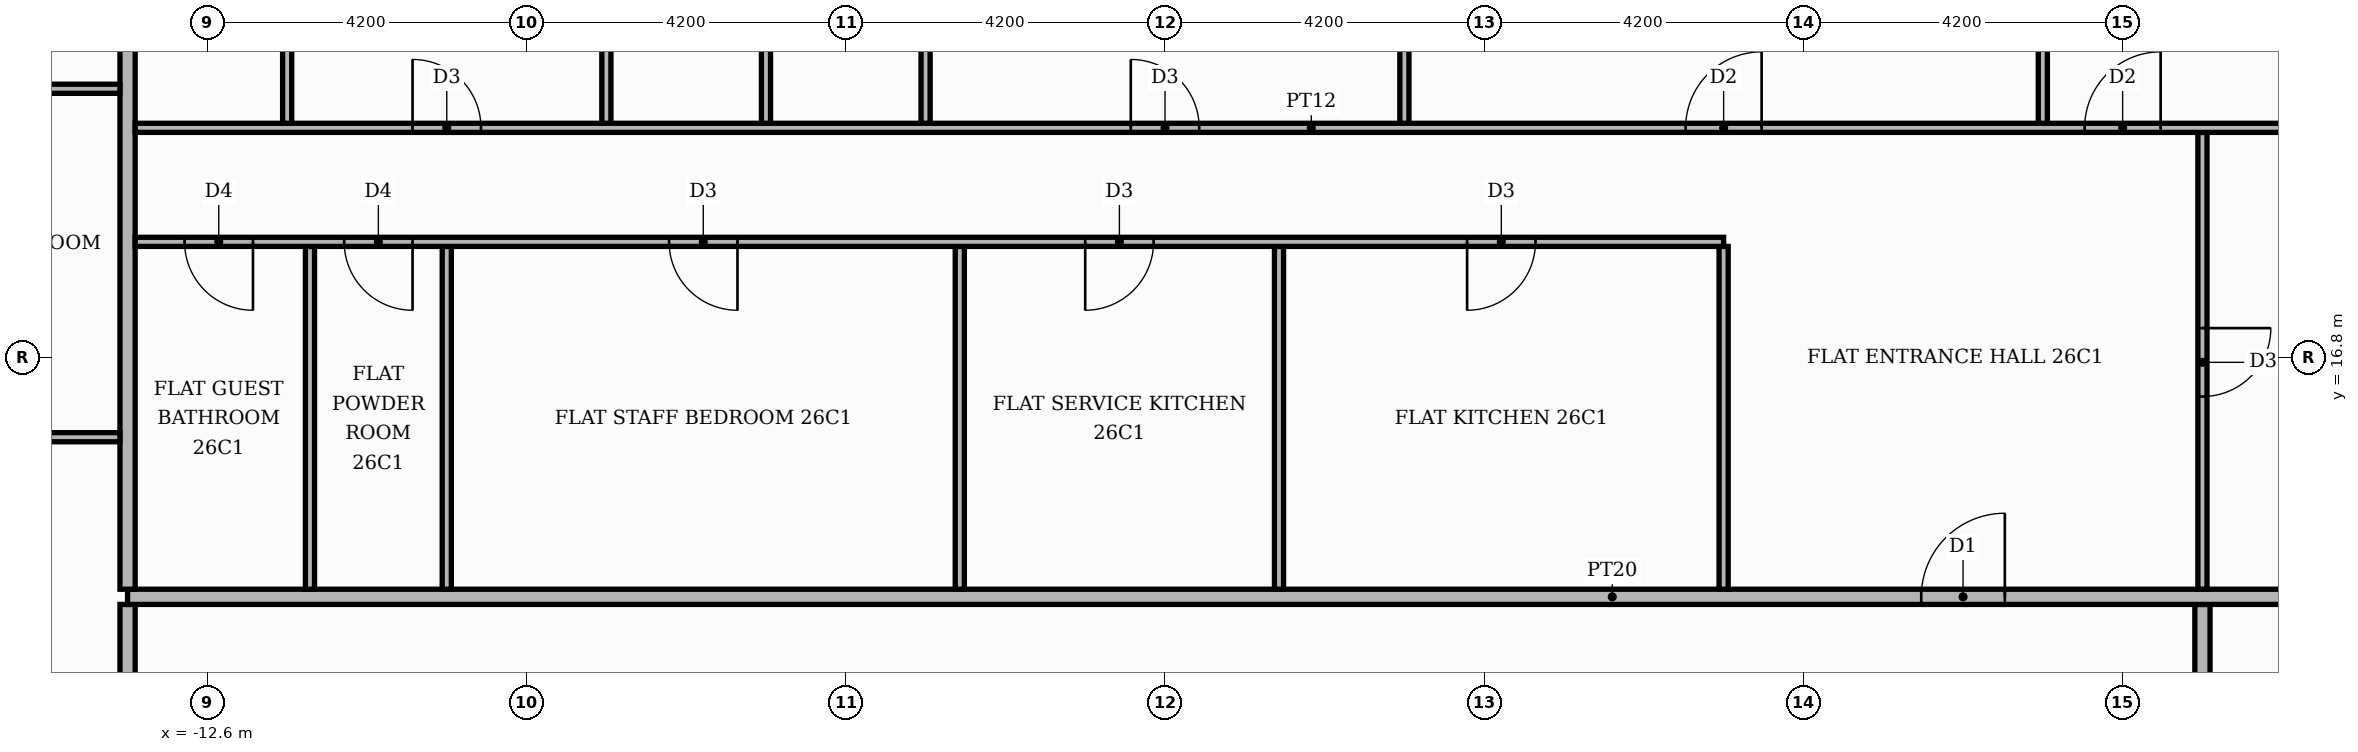
"""IFC4 building model, lengths in metres.
Left out: names, types, materials, properties, quantities, classifications, styles, units other than length and angle.
Written with IfcOpenShell. Run it as: python <this file> out.ifc"""

import sys

from ifc_helpers import new_model, si_unit, direction, frame, frame_2d, origin, place, context, subcontext, project, spatial, rectangle, extrude, element, fill, save


model = new_model("IFC4")
c1 = context("Model", 3, precision=1e-05, world=origin(), true_north=direction((0.0, 1.0)))
c2 = subcontext(c1, "Body", "Model", "MODEL_VIEW")
j1 = project(units=[si_unit("LENGTHUNIT", "METRE"), si_unit("PLANEANGLEUNIT", "RADIAN")], contexts=[c1])
p1 = place(None, origin())
s1 = spatial("IfcSite", under=j1, at=p1, CompositionType="ELEMENT")
p2 = place(p1, origin())
s2 = spatial("IfcBuilding", under=s1, at=p2, CompositionType="ELEMENT")
p3 = place(p2, frame((0.0, 0.0, 110.4)))
s3 = spatial("IfcBuildingStorey", under=s2, at=p3, CompositionType="ELEMENT", Elevation=110.4)
p4 = place(p3, frame((13.65, -13.55, 0.0), z_axis=(0.0, 0.0, 1.0), x_axis=(0.0, 1.0, 0.0)))
e1 = element("IfcWall", 1, at=p4, inside=s3, PredefinedType="PARTITIONING", context=c2, shape_type="SweptSolid", body=[
    extrude(rectangle(XDim=27.1, YDim=0.2, at=frame_2d((13.55, 0.0))), origin(), (0.0, 0.0, 1.0), 3.48),
])
p5 = place(p4, frame((2.5, 0.0, 0.0)))
e2 = element("IfcOpeningElement", 2, at=p5, cuts=e1, PredefinedType="OPENING", context=c2, shape_type="SweptSolid", body=[
    extrude(rectangle(XDim=1.1, YDim=2.4, at=frame_2d((0.55, 1.2))), frame((0.0, 0.11, 0.0), z_axis=(0.0, -1.0, 0.0), x_axis=(1.0, 0.0, 0.0)), (0.0, 0.0, 1.0), 0.22),
])
p6 = place(p3, frame((-13.65, 5.35, 0.0), z_axis=(0.0, 0.0, 1.0), x_axis=(0.0, 1.0, 0.0)))
e3 = element("IfcWall", 3, at=p6, inside=s3, PredefinedType="PARTITIONING", context=c2, shape_type="SweptSolid", body=[
    extrude(rectangle(XDim=8.2, YDim=0.2, at=frame_2d((4.1, 0.0))), origin(), (0.0, 0.0, 1.0), 3.48),
])
p7 = place(p6, frame((5.65, 0.0, 0.0)))
e4 = element("IfcOpeningElement", 4, at=p7, cuts=e3, PredefinedType="OPENING", context=c2, shape_type="SweptSolid", body=[
    extrude(rectangle(XDim=1.1, YDim=2.4, at=frame_2d((0.55, 1.2))), frame((0.0, 0.11, 0.0), z_axis=(0.0, -1.0, 0.0), x_axis=(1.0, 0.0, 0.0)), (0.0, 0.0, 1.0), 0.22),
])
p8 = place(p3, frame((-13.65, 13.65, 0.0), z_axis=(0.0, 0.0, 1.0), x_axis=(1.0, 0.0, 0.0)))
e5 = element("IfcWall", 5, at=p8, inside=s3, PredefinedType="PARTITIONING", context=c2, shape_type="SweptSolid", body=[
    extrude(rectangle(XDim=39.07, YDim=0.2, at=frame_2d((19.535, 0.0))), origin(), (0.0, 0.0, 1.0), 3.48),
])
p9 = place(p8, frame((23.6, 0.0, 0.0)))
e6 = element("IfcOpeningElement", 6, at=p9, cuts=e5, PredefinedType="OPENING", context=c2, shape_type="SweptSolid", body=[
    extrude(rectangle(XDim=1.1, YDim=2.4, at=frame_2d((0.55, 1.2))), frame((0.0, 0.11, 0.0), z_axis=(0.0, -1.0, 0.0), x_axis=(1.0, 0.0, 0.0)), (0.0, 0.0, 1.0), 0.22),
])
p10 = place(p3, frame((-13.65, 13.75, 0.0), z_axis=(0.0, 0.0, 1.0), x_axis=(0.0, 1.0, 0.0)))
e7 = element("IfcWall", 7, at=p10, inside=s3, PredefinedType="PARTITIONING", context=c2, shape_type="SweptSolid", body=[
    extrude(rectangle(XDim=11.67, YDim=0.2, at=frame_2d((5.835, 0.0))), origin(), (0.0, 0.0, 1.0), 3.48),
])
for number, where, z_axis, x_axis in (
    (8, (-11.25, 13.75, 0.0), (0.0, 0.0, 1.0), (0.0, 1.0, 0.0)),
    (9, (-9.45, 13.75, 0.0), (0.0, 0.0, 1.0), (0.0, 1.0, 0.0)),
    (10, (-2.7, 13.75, 0.0), (0.0, 0.0, 1.0), (0.0, 1.0, 0.0)),
    (11, (1.5, 13.75, 0.0), (0.0, 0.0, 1.0), (0.0, 1.0, 0.0)),
    (12, (7.35, 13.75, 0.0), (0.0, 0.0, 1.0), (0.0, 1.0, 0.0)),
):
    element("IfcWall", number, at=place(p3, frame(where, z_axis=z_axis, x_axis=x_axis)), inside=s3, PredefinedType="PARTITIONING", context=c2, shape_type="SweptSolid", body=[
        extrude(rectangle(XDim=4.51, YDim=0.12, at=frame_2d((2.255, 0.0))), origin(), (0.0, 0.0, 1.0), 3.48),
    ])
p11 = place(p3, frame((13.65, 13.75, 0.0), z_axis=(0.0, 0.0, 1.0), x_axis=(0.0, 1.0, 0.0)))
e13 = element("IfcWall", 13, at=p11, inside=s3, PredefinedType="PARTITIONING", context=c2, shape_type="SweptSolid", body=[
    extrude(rectangle(XDim=6.01, YDim=0.12, at=frame_2d((3.005, 0.0))), origin(), (0.0, 0.0, 1.0), 3.48),
])
p12 = place(p11, frame((2.535, 0.0, 0.0)))
e14 = element("IfcOpeningElement", 14, at=p12, cuts=e13, PredefinedType="OPENING", context=c2, shape_type="SweptSolid", body=[
    extrude(rectangle(XDim=0.9, YDim=2.1, at=frame_2d((0.45, 1.05))), frame((0.0, 0.07, 0.0), z_axis=(0.0, -1.0, 0.0), x_axis=(1.0, 0.0, 0.0)), (0.0, 0.0, 1.0), 0.14),
])
p13 = place(p3, frame((-20.72, 15.75, 0.0), z_axis=(0.0, 0.0, 1.0), x_axis=(1.0, 0.0, 0.0)))
e15 = element("IfcWall", 15, at=p13, inside=s3, PredefinedType="PARTITIONING", context=c2, shape_type="SweptSolid", body=[
    extrude(rectangle(XDim=6.97, YDim=0.12, at=frame_2d((3.485, 0.0))), origin(), (0.0, 0.0, 1.0), 3.48),
])
p14 = place(p13, frame((3.035, 0.0, 0.0)))
e16 = element("IfcOpeningElement", 16, at=p14, cuts=e15, PredefinedType="OPENING", context=c2, shape_type="SweptSolid", body=[
    extrude(rectangle(XDim=1.0, YDim=2.1, at=frame_2d((0.5, 1.05))), frame((0.0, 0.07, 0.0), z_axis=(0.0, -1.0, 0.0), x_axis=(1.0, 0.0, 0.0)), (0.0, 0.0, 1.0), 0.14),
])
p15 = place(p3, frame((-13.55, 18.32, 0.0), z_axis=(0.0, 0.0, 1.0), x_axis=(1.0, 0.0, 0.0)))
e17 = element("IfcWall", 17, at=p15, inside=s3, PredefinedType="PARTITIONING", context=c2, shape_type="SweptSolid", body=[
    extrude(rectangle(XDim=20.9, YDim=0.12, at=frame_2d((10.45, 0.0))), origin(), (0.0, 0.0, 1.0), 3.48),
])
p16 = place(p15, frame((17.525, 0.0, 0.0)))
e18 = element("IfcOpeningElement", 18, at=p16, cuts=e17, PredefinedType="OPENING", context=c2, shape_type="SweptSolid", body=[
    extrude(rectangle(XDim=0.9, YDim=2.1, at=frame_2d((0.45, 1.05))), frame((0.0, 0.07, 0.0), z_axis=(0.0, -1.0, 0.0), x_axis=(1.0, 0.0, 0.0)), (0.0, 0.0, 1.0), 0.14),
])
p17 = place(p15, frame((12.5, 0.0, 0.0)))
e19 = element("IfcOpeningElement", 19, at=p17, cuts=e17, PredefinedType="OPENING", context=c2, shape_type="SweptSolid", body=[
    extrude(rectangle(XDim=0.9, YDim=2.1, at=frame_2d((0.45, 1.05))), frame((0.0, 0.07, 0.0), z_axis=(0.0, -1.0, 0.0), x_axis=(1.0, 0.0, 0.0)), (0.0, 0.0, 1.0), 0.14),
])
p18 = place(p15, frame((7.025, 0.0, 0.0)))
e20 = element("IfcOpeningElement", 20, at=p18, cuts=e17, PredefinedType="OPENING", context=c2, shape_type="SweptSolid", body=[
    extrude(rectangle(XDim=0.9, YDim=2.1, at=frame_2d((0.45, 1.05))), frame((0.0, 0.07, 0.0), z_axis=(0.0, -1.0, 0.0), x_axis=(1.0, 0.0, 0.0)), (0.0, 0.0, 1.0), 0.14),
])
p19 = place(p15, frame((2.75, 0.0, 0.0)))
e21 = element("IfcOpeningElement", 21, at=p19, cuts=e17, PredefinedType="OPENING", context=c2, shape_type="SweptSolid", body=[
    extrude(rectangle(XDim=0.9, YDim=2.1, at=frame_2d((0.45, 1.05))), frame((0.0, 0.07, 0.0), z_axis=(0.0, -1.0, 0.0), x_axis=(1.0, 0.0, 0.0)), (0.0, 0.0, 1.0), 0.14),
])
p20 = place(p15, frame((0.65, 0.0, 0.0)))
e22 = element("IfcOpeningElement", 22, at=p20, cuts=e17, PredefinedType="OPENING", context=c2, shape_type="SweptSolid", body=[
    extrude(rectangle(XDim=0.9, YDim=2.1, at=frame_2d((0.45, 1.05))), frame((0.0, 0.07, 0.0), z_axis=(0.0, -1.0, 0.0), x_axis=(1.0, 0.0, 0.0)), (0.0, 0.0, 1.0), 0.14),
])
p21 = place(p3, frame((-13.55, 19.82, 0.0), z_axis=(0.0, 0.0, 1.0), x_axis=(1.0, 0.0, 0.0)))
e23 = element("IfcWall", 23, at=p21, inside=s3, PredefinedType="PARTITIONING", context=c2, shape_type="SweptSolid", body=[
    extrude(rectangle(XDim=30.95, YDim=0.12, at=frame_2d((15.475, 0.0))), origin(), (0.0, 0.0, 1.0), 3.48),
])
p22 = place(p21, frame((25.65, 0.0, 0.0)))
e24 = element("IfcOpeningElement", 24, at=p22, cuts=e23, PredefinedType="OPENING", context=c2, shape_type="SweptSolid", body=[
    extrude(rectangle(XDim=1.0, YDim=2.1, at=frame_2d((0.5, 1.05))), frame((0.0, 0.07, 0.0), z_axis=(0.0, -1.0, 0.0), x_axis=(1.0, 0.0, 0.0)), (0.0, 0.0, 1.0), 0.14),
])
p23 = place(p21, frame((20.4, 0.0, 0.0)))
e25 = element("IfcOpeningElement", 25, at=p23, cuts=e23, PredefinedType="OPENING", context=c2, shape_type="SweptSolid", body=[
    extrude(rectangle(XDim=1.0, YDim=2.1, at=frame_2d((0.5, 1.05))), frame((0.0, 0.07, 0.0), z_axis=(0.0, -1.0, 0.0), x_axis=(1.0, 0.0, 0.0)), (0.0, 0.0, 1.0), 0.14),
])
p24 = place(p21, frame((13.1, 0.0, 0.0)))
e26 = element("IfcOpeningElement", 26, at=p24, cuts=e23, PredefinedType="OPENING", context=c2, shape_type="SweptSolid", body=[
    extrude(rectangle(XDim=0.9, YDim=2.1, at=frame_2d((0.45, 1.05))), frame((0.0, 0.07, 0.0), z_axis=(0.0, -1.0, 0.0), x_axis=(1.0, 0.0, 0.0)), (0.0, 0.0, 1.0), 0.14),
])
p25 = place(p21, frame((3.65, 0.0, 0.0)))
e27 = element("IfcOpeningElement", 27, at=p25, cuts=e23, PredefinedType="OPENING", context=c2, shape_type="SweptSolid", body=[
    extrude(rectangle(XDim=0.9, YDim=2.1, at=frame_2d((0.45, 1.05))), frame((0.0, 0.07, 0.0), z_axis=(0.0, -1.0, 0.0), x_axis=(1.0, 0.0, 0.0)), (0.0, 0.0, 1.0), 0.14),
])
p26 = place(p3, frame((-11.55, 19.88, 0.0), z_axis=(0.0, 0.0, 1.0), x_axis=(0.0, 1.0, 0.0)))
e28 = element("IfcWall", 28, at=p26, inside=s3, PredefinedType="PARTITIONING", context=c2, shape_type="SweptSolid", body=[
    extrude(rectangle(XDim=5.54, YDim=0.12, at=frame_2d((2.77, 0.0))), origin(), (0.0, 0.0, 1.0), 3.48),
])
p27 = place(p26, frame((2.44, 0.0, 0.0)))
e29 = element("IfcOpeningElement", 29, at=p27, cuts=e28, PredefinedType="OPENING", context=c2, shape_type="SweptSolid", body=[
    extrude(rectangle(XDim=0.9, YDim=2.1, at=frame_2d((0.45, 1.05))), frame((0.0, 0.07, 0.0), z_axis=(0.0, -1.0, 0.0), x_axis=(1.0, 0.0, 0.0)), (0.0, 0.0, 1.0), 0.14),
])
p28 = place(p3, frame((-7.35, 19.88, 0.0), z_axis=(0.0, 0.0, 1.0), x_axis=(0.0, 1.0, 0.0)))
e30 = element("IfcWall", 30, at=p28, inside=s3, PredefinedType="PARTITIONING", context=c2, shape_type="SweptSolid", body=[
    extrude(rectangle(XDim=5.54, YDim=0.12, at=frame_2d((2.77, 0.0))), origin(), (0.0, 0.0, 1.0), 3.48),
])
p29 = place(p3, frame((-5.25, 19.88, 0.0), z_axis=(0.0, 0.0, 1.0), x_axis=(0.0, 1.0, 0.0)))
e31 = element("IfcWall", 31, at=p29, inside=s3, PredefinedType="PARTITIONING", context=c2, shape_type="SweptSolid", body=[
    extrude(rectangle(XDim=5.54, YDim=0.12, at=frame_2d((2.77, 0.0))), origin(), (0.0, 0.0, 1.0), 3.48),
])
p30 = place(p29, frame((2.44, 0.0, 0.0)))
e32 = element("IfcOpeningElement", 32, at=p30, cuts=e31, PredefinedType="OPENING", context=c2, shape_type="SweptSolid", body=[
    extrude(rectangle(XDim=0.9, YDim=2.1, at=frame_2d((0.45, 1.05))), frame((0.0, 0.07, 0.0), z_axis=(0.0, -1.0, 0.0), x_axis=(1.0, 0.0, 0.0)), (0.0, 0.0, 1.0), 0.14),
])
p31 = place(p3, frame((-3.15, 19.88, 0.0), z_axis=(0.0, 0.0, 1.0), x_axis=(0.0, 1.0, 0.0)))
e33 = element("IfcWall", 33, at=p31, inside=s3, PredefinedType="PARTITIONING", context=c2, shape_type="SweptSolid", body=[
    extrude(rectangle(XDim=5.54, YDim=0.12, at=frame_2d((2.77, 0.0))), origin(), (0.0, 0.0, 1.0), 3.48),
])
p32 = place(p31, frame((2.44, 0.0, 0.0)))
e34 = element("IfcOpeningElement", 34, at=p32, cuts=e33, PredefinedType="OPENING", context=c2, shape_type="SweptSolid", body=[
    extrude(rectangle(XDim=0.9, YDim=2.1, at=frame_2d((0.45, 1.05))), frame((0.0, 0.07, 0.0), z_axis=(0.0, -1.0, 0.0), x_axis=(1.0, 0.0, 0.0)), (0.0, 0.0, 1.0), 0.14),
])
for number, where, z_axis, x_axis in (
    (35, (3.15, 19.88, 0.0), (0.0, 0.0, 1.0), (0.0, 1.0, 0.0)),
    (36, (11.55, 19.88, 0.0), (0.0, 0.0, 1.0), (0.0, 1.0, 0.0)),
):
    element("IfcWall", number, at=place(p3, frame(where, z_axis=z_axis, x_axis=x_axis)), inside=s3, PredefinedType="PARTITIONING", context=c2, shape_type="SweptSolid", body=[
        extrude(rectangle(XDim=5.54, YDim=0.12, at=frame_2d((2.77, 0.0))), origin(), (0.0, 0.0, 1.0), 3.48),
    ])
p33 = place(p3, frame((-20.72, 20.334, 0.0), z_axis=(0.0, 0.0, 1.0), x_axis=(1.0, 0.0, 0.0)))
e37 = element("IfcWall", 37, at=p33, inside=s3, PredefinedType="PARTITIONING", context=c2, shape_type="SweptSolid", body=[
    extrude(rectangle(XDim=6.97, YDim=0.12, at=frame_2d((3.485, 0.0))), origin(), (0.0, 0.0, 1.0), 3.48),
])
p34 = place(p33, frame((4.853, 0.0, 0.0)))
e38 = element("IfcOpeningElement", 38, at=p34, cuts=e37, PredefinedType="OPENING", context=c2, shape_type="SweptSolid", body=[
    extrude(rectangle(XDim=0.9, YDim=2.1, at=frame_2d((0.45, 1.05))), frame((0.0, 0.07, 0.0), z_axis=(0.0, -1.0, 0.0), x_axis=(1.0, 0.0, 0.0)), (0.0, 0.0, 1.0), 0.14),
])
p35 = place(p9, origin())
e39 = element("IfcDoor", 39, at=p35, inside=s3, OperationType="SINGLE_SWING_RIGHT", PredefinedType="DOOR", context=c2, shape_type="SweptSolid", body=[
    extrude(rectangle(XDim=1.1, YDim=2.4, at=frame_2d((0.55, 1.2))), frame((0.0, 0.025, 0.0), z_axis=(0.0, -1.0, 0.0), x_axis=(1.0, 0.0, 0.0)), (0.0, 0.0, 1.0), 0.05),
])
fill(e6, e39)
p36 = place(p12, frame((0.9, 0.0, 0.0), z_axis=(0.0, 0.0, 1.0), x_axis=(-1.0, 0.0, 0.0)))
e40 = element("IfcDoor", 40, at=p36, inside=s3, OperationType="SINGLE_SWING_RIGHT", PredefinedType="DOOR", context=c2, shape_type="SweptSolid", body=[
    extrude(rectangle(XDim=0.9, YDim=2.1, at=frame_2d((0.45, 1.05))), frame((0.0, 0.025, 0.0), z_axis=(0.0, -1.0, 0.0), x_axis=(1.0, 0.0, 0.0)), (0.0, 0.0, 1.0), 0.05),
])
fill(e14, e40)
p37 = place(p16, frame((0.9, 0.0, 0.0), z_axis=(0.0, 0.0, 1.0), x_axis=(-1.0, 0.0, 0.0)))
e41 = element("IfcDoor", 41, at=p37, inside=s3, OperationType="SINGLE_SWING_LEFT", PredefinedType="DOOR", context=c2, shape_type="SweptSolid", body=[
    extrude(rectangle(XDim=0.9, YDim=2.1, at=frame_2d((0.45, 1.05))), frame((0.0, 0.025, 0.0), z_axis=(0.0, -1.0, 0.0), x_axis=(1.0, 0.0, 0.0)), (0.0, 0.0, 1.0), 0.05),
])
fill(e18, e41)
p38 = place(p17, frame((0.9, 0.0, 0.0), z_axis=(0.0, 0.0, 1.0), x_axis=(-1.0, 0.0, 0.0)))
e42 = element("IfcDoor", 42, at=p38, inside=s3, OperationType="SINGLE_SWING_LEFT", PredefinedType="DOOR", context=c2, shape_type="SweptSolid", body=[
    extrude(rectangle(XDim=0.9, YDim=2.1, at=frame_2d((0.45, 1.05))), frame((0.0, 0.025, 0.0), z_axis=(0.0, -1.0, 0.0), x_axis=(1.0, 0.0, 0.0)), (0.0, 0.0, 1.0), 0.05),
])
fill(e19, e42)
p39 = place(p18, frame((0.9, 0.0, 0.0), z_axis=(0.0, 0.0, 1.0), x_axis=(-1.0, 0.0, 0.0)))
e43 = element("IfcDoor", 43, at=p39, inside=s3, OperationType="SINGLE_SWING_RIGHT", PredefinedType="DOOR", context=c2, shape_type="SweptSolid", body=[
    extrude(rectangle(XDim=0.9, YDim=2.1, at=frame_2d((0.45, 1.05))), frame((0.0, 0.025, 0.0), z_axis=(0.0, -1.0, 0.0), x_axis=(1.0, 0.0, 0.0)), (0.0, 0.0, 1.0), 0.05),
])
fill(e20, e43)
p40 = place(p19, frame((0.9, 0.0, 0.0), z_axis=(0.0, 0.0, 1.0), x_axis=(-1.0, 0.0, 0.0)))
e44 = element("IfcDoor", 44, at=p40, inside=s3, OperationType="SINGLE_SWING_RIGHT", PredefinedType="DOOR", context=c2, shape_type="SweptSolid", body=[
    extrude(rectangle(XDim=0.9, YDim=2.1, at=frame_2d((0.45, 1.05))), frame((0.0, 0.025, 0.0), z_axis=(0.0, -1.0, 0.0), x_axis=(1.0, 0.0, 0.0)), (0.0, 0.0, 1.0), 0.05),
])
fill(e21, e44)
p41 = place(p20, frame((0.9, 0.0, 0.0), z_axis=(0.0, 0.0, 1.0), x_axis=(-1.0, 0.0, 0.0)))
e45 = element("IfcDoor", 45, at=p41, inside=s3, OperationType="SINGLE_SWING_RIGHT", PredefinedType="DOOR", context=c2, shape_type="SweptSolid", body=[
    extrude(rectangle(XDim=0.9, YDim=2.1, at=frame_2d((0.45, 1.05))), frame((0.0, 0.025, 0.0), z_axis=(0.0, -1.0, 0.0), x_axis=(1.0, 0.0, 0.0)), (0.0, 0.0, 1.0), 0.05),
])
fill(e22, e45)
p42 = place(p22, origin())
e46 = element("IfcDoor", 46, at=p42, inside=s3, OperationType="SINGLE_SWING_RIGHT", PredefinedType="DOOR", context=c2, shape_type="SweptSolid", body=[
    extrude(rectangle(XDim=1.0, YDim=2.1, at=frame_2d((0.5, 1.05))), frame((0.0, 0.025, 0.0), z_axis=(0.0, -1.0, 0.0), x_axis=(1.0, 0.0, 0.0)), (0.0, 0.0, 1.0), 0.05),
])
fill(e24, e46)
p43 = place(p23, origin())
e47 = element("IfcDoor", 47, at=p43, inside=s3, OperationType="SINGLE_SWING_RIGHT", PredefinedType="DOOR", context=c2, shape_type="SweptSolid", body=[
    extrude(rectangle(XDim=1.0, YDim=2.1, at=frame_2d((0.5, 1.05))), frame((0.0, 0.025, 0.0), z_axis=(0.0, -1.0, 0.0), x_axis=(1.0, 0.0, 0.0)), (0.0, 0.0, 1.0), 0.05),
])
fill(e25, e47)
p44 = place(p24, origin())
e48 = element("IfcDoor", 48, at=p44, inside=s3, OperationType="SINGLE_SWING_LEFT", PredefinedType="DOOR", context=c2, shape_type="SweptSolid", body=[
    extrude(rectangle(XDim=0.9, YDim=2.1, at=frame_2d((0.45, 1.05))), frame((0.0, 0.025, 0.0), z_axis=(0.0, -1.0, 0.0), x_axis=(1.0, 0.0, 0.0)), (0.0, 0.0, 1.0), 0.05),
])
fill(e26, e48)
p45 = place(p25, origin())
e49 = element("IfcDoor", 49, at=p45, inside=s3, OperationType="SINGLE_SWING_LEFT", PredefinedType="DOOR", context=c2, shape_type="SweptSolid", body=[
    extrude(rectangle(XDim=0.9, YDim=2.1, at=frame_2d((0.45, 1.05))), frame((0.0, 0.025, 0.0), z_axis=(0.0, -1.0, 0.0), x_axis=(1.0, 0.0, 0.0)), (0.0, 0.0, 1.0), 0.05),
])
fill(e27, e49)
save(model, sys.argv[1])
